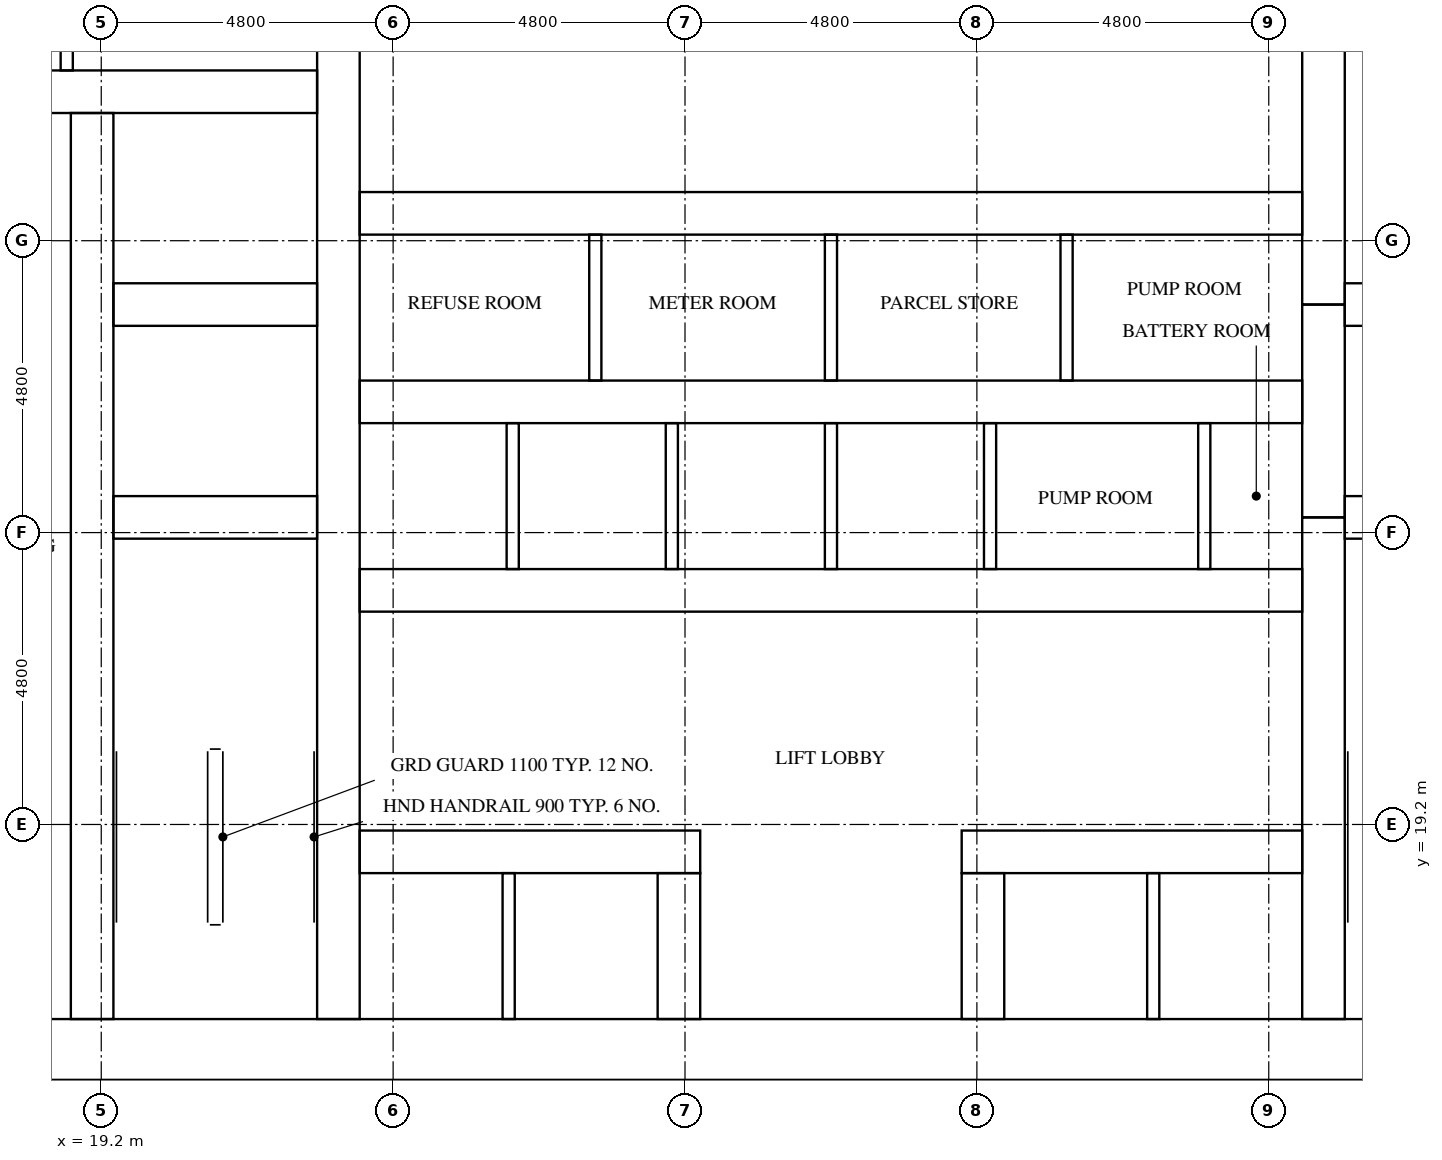
"""IFC4 building model, lengths in metres.
Left out: names, types, materials, properties, quantities, classifications, styles, units other than length and angle.
Written with IfcOpenShell. Run it as: python <this file> out.ifc"""

import sys

from ifc_helpers import new_model, si_unit, direction, frame, frame_2d, origin, place, context, subcontext, project, spatial, rectangle, extrude, element, fill, save


model = new_model("IFC4")
c1 = context("Model", 3, precision=1e-05, world=origin(), true_north=direction((0.0, 1.0)))
c2 = subcontext(c1, "Body", "Model", "MODEL_VIEW")
j1 = project(units=[si_unit("LENGTHUNIT", "METRE"), si_unit("PLANEANGLEUNIT", "RADIAN")], contexts=[c1])
p1 = place(None, origin())
s1 = spatial("IfcSite", under=j1, at=p1, CompositionType="ELEMENT")
p2 = place(p1, origin())
s2 = spatial("IfcBuilding", under=s1, at=p2, CompositionType="ELEMENT")
p3 = place(p2, frame((0.0, 0.0, 46.9)))
s3 = spatial("IfcBuildingStorey", under=s2, at=p3, CompositionType="ELEMENT", Elevation=46.9)
p4 = place(p3, frame((15.0, 15.5, 0.0), z_axis=(0.0, 0.0, 1.0), x_axis=(1.0, 0.0, 0.0)))
e1 = element("IfcWall", 1, at=p4, inside=s3, PredefinedType="SHEAR", context=c2, shape_type="SweptSolid", body=[
    extrude(rectangle(XDim=32.4, YDim=1.0, at=frame_2d((16.2, 0.0))), origin(), (0.0, 0.0, 1.0), 3.2),
])
p5 = place(p4, frame((15.3, 0.0, 0.0)))
e2 = element("IfcOpeningElement", 2, at=p5, cuts=e1, PredefinedType="OPENING", context=c2, shape_type="SweptSolid", body=[
    extrude(rectangle(XDim=1.8, YDim=2.1, at=frame_2d((0.9, 1.05))), frame((0.0, 0.51, 0.0), z_axis=(0.0, -1.0, 0.0), x_axis=(1.0, 0.0, 0.0)), (0.0, 0.0, 1.0), 1.02),
])
p6 = place(p3, frame((19.05, 16.0, 0.0), z_axis=(0.0, 0.0, 1.0), x_axis=(0.0, 1.0, 0.0)))
e3 = element("IfcWall", 3, at=p6, inside=s3, PredefinedType="SHEAR", context=c2, shape_type="SweptSolid", body=[
    extrude(rectangle(XDim=14.9, YDim=0.7, at=frame_2d((7.45, 0.0))), origin(), (0.0, 0.0, 1.0), 3.2),
])
p7 = place(p6, frame((9.45, 0.0, 0.0)))
e4 = element("IfcOpeningElement", 4, at=p7, cuts=e3, PredefinedType="OPENING", context=c2, shape_type="SweptSolid", body=[
    extrude(rectangle(XDim=1.1, YDim=2.1, at=frame_2d((0.55, 1.05))), frame((0.0, 0.36, 0.0), z_axis=(0.0, -1.0, 0.0), x_axis=(1.0, 0.0, 0.0)), (0.0, 0.0, 1.0), 0.72),
])
p8 = place(p6, frame((12.95, 0.0, 0.0)))
e5 = element("IfcOpeningElement", 5, at=p8, cuts=e3, PredefinedType="OPENING", context=c2, shape_type="SweptSolid", body=[
    extrude(rectangle(XDim=1.1, YDim=2.1, at=frame_2d((0.55, 1.05))), frame((0.0, 0.36, 0.0), z_axis=(0.0, -1.0, 0.0), x_axis=(1.0, 0.0, 0.0)), (0.0, 0.0, 1.0), 0.72),
])
p9 = place(p6, frame((0.2, 0.0, 0.0)))
e6 = element("IfcOpeningElement", 6, at=p9, cuts=e3, PredefinedType="OPENING", context=c2, shape_type="SweptSolid", body=[
    extrude(rectangle(XDim=1.2, YDim=2.1, at=frame_2d((0.6, 1.05))), frame((0.0, 0.36, 0.0), z_axis=(0.0, -1.0, 0.0), x_axis=(1.0, 0.0, 0.0)), (0.0, 0.0, 1.0), 0.72),
])
p10 = place(p3, frame((23.1, 16.0, 0.0), z_axis=(0.0, 0.0, 1.0), x_axis=(0.0, 1.0, 0.0)))
e7 = element("IfcWall", 7, at=p10, inside=s3, PredefinedType="SHEAR", context=c2, shape_type="SweptSolid", body=[
    extrude(rectangle(XDim=20.8, YDim=0.7, at=frame_2d((10.4, 0.0))), origin(), (0.0, 0.0, 1.0), 3.2),
])
p11 = place(p3, frame((39.3, 16.0, 0.0), z_axis=(0.0, 0.0, 1.0), x_axis=(0.0, 1.0, 0.0)))
e8 = element("IfcWall", 8, at=p11, inside=s3, PredefinedType="SHEAR", context=c2, shape_type="SweptSolid", body=[
    extrude(rectangle(XDim=8.25, YDim=0.7, at=frame_2d((4.125, 0.0))), origin(), (0.0, 0.0, 1.0), 3.2),
])
p12 = place(p3, frame((39.3, 24.25, 0.0), z_axis=(0.0, 0.0, 1.0), x_axis=(0.0, 1.0, 0.0)))
e9 = element("IfcWall", 9, at=p12, inside=s3, PredefinedType="SHEAR", context=c2, shape_type="SweptSolid", body=[
    extrude(rectangle(XDim=3.5, YDim=0.7, at=frame_2d((1.75, 0.0))), origin(), (0.0, 0.0, 1.0), 3.2),
])
p13 = place(p3, frame((39.3, 27.75, 0.0), z_axis=(0.0, 0.0, 1.0), x_axis=(0.0, 1.0, 0.0)))
e10 = element("IfcWall", 10, at=p13, inside=s3, PredefinedType="SHEAR", context=c2, shape_type="SweptSolid", body=[
    extrude(rectangle(XDim=9.05, YDim=0.7, at=frame_2d((4.525, 0.0))), origin(), (0.0, 0.0, 1.0), 3.2),
])
for number, where, z_axis, x_axis in (
    (11, (19.4, 24.25, 0.0), (0.0, 0.0, 1.0), (1.0, 0.0, 0.0)),
    (12, (19.4, 27.75, 0.0), (0.0, 0.0, 1.0), (1.0, 0.0, 0.0)),
):
    element("IfcWall", number, at=place(p3, frame(where, z_axis=z_axis, x_axis=x_axis)), inside=s3, PredefinedType="SHEAR", context=c2, shape_type="SweptSolid", body=[
        extrude(rectangle(XDim=3.35, YDim=0.7, at=frame_2d((1.675, 0.0))), origin(), (0.0, 0.0, 1.0), 3.2),
    ])
p14 = place(p3, frame((16.0, 31.25, 0.0), z_axis=(0.0, 0.0, 1.0), x_axis=(1.0, 0.0, 0.0)))
e13 = element("IfcWall", 13, at=p14, inside=s3, PredefinedType="SHEAR", context=c2, shape_type="SweptSolid", body=[
    extrude(rectangle(XDim=6.75, YDim=0.7, at=frame_2d((3.375, 0.0))), origin(), (0.0, 0.0, 1.0), 3.2),
])
for number, where, z_axis, x_axis in (
    (14, (39.65, 24.25, 0.0), (0.0, 0.0, 1.0), (1.0, 0.0, 0.0)),
    (15, (39.65, 27.75, 0.0), (0.0, 0.0, 1.0), (1.0, 0.0, 0.0)),
):
    element("IfcWall", number, at=place(p3, frame(where, z_axis=z_axis, x_axis=x_axis)), inside=s3, PredefinedType="SHEAR", context=c2, shape_type="SweptSolid", body=[
        extrude(rectangle(XDim=3.35, YDim=0.7, at=frame_2d((1.675, 0.0))), origin(), (0.0, 0.0, 1.0), 3.2),
    ])
p15 = place(p3, frame((23.45, 18.75, 0.0), z_axis=(0.0, 0.0, 1.0), x_axis=(1.0, 0.0, 0.0)))
e16 = element("IfcWall", 16, at=p15, inside=s3, PredefinedType="SHEAR", context=c2, shape_type="SweptSolid", body=[
    extrude(rectangle(XDim=5.6, YDim=0.7, at=frame_2d((2.8, 0.0))), origin(), (0.0, 0.0, 1.0), 3.2),
])
p16 = place(p15, frame((0.625, 0.0, 0.0)))
e17 = element("IfcOpeningElement", 17, at=p16, cuts=e16, PredefinedType="OPENING", context=c2, shape_type="SweptSolid", body=[
    extrude(rectangle(XDim=1.1, YDim=2.1, at=frame_2d((0.55, 1.05))), frame((0.0, 0.36, 0.0), z_axis=(0.0, -1.0, 0.0), x_axis=(1.0, 0.0, 0.0)), (0.0, 0.0, 1.0), 0.72),
])
p17 = place(p15, frame((3.175, 0.0, 0.0)))
e18 = element("IfcOpeningElement", 18, at=p17, cuts=e16, PredefinedType="OPENING", context=c2, shape_type="SweptSolid", body=[
    extrude(rectangle(XDim=1.1, YDim=2.1, at=frame_2d((0.55, 1.05))), frame((0.0, 0.36, 0.0), z_axis=(0.0, -1.0, 0.0), x_axis=(1.0, 0.0, 0.0)), (0.0, 0.0, 1.0), 0.72),
])
p18 = place(p3, frame((33.35, 18.75, 0.0), z_axis=(0.0, 0.0, 1.0), x_axis=(1.0, 0.0, 0.0)))
e19 = element("IfcWall", 19, at=p18, inside=s3, PredefinedType="SHEAR", context=c2, shape_type="SweptSolid", body=[
    extrude(rectangle(XDim=5.6, YDim=0.7, at=frame_2d((2.8, 0.0))), origin(), (0.0, 0.0, 1.0), 3.2),
])
p19 = place(p18, frame((1.325, 0.0, 0.0)))
e20 = element("IfcOpeningElement", 20, at=p19, cuts=e19, PredefinedType="OPENING", context=c2, shape_type="SweptSolid", body=[
    extrude(rectangle(XDim=1.1, YDim=2.1, at=frame_2d((0.55, 1.05))), frame((0.0, 0.36, 0.0), z_axis=(0.0, -1.0, 0.0), x_axis=(1.0, 0.0, 0.0)), (0.0, 0.0, 1.0), 0.72),
])
p20 = place(p18, frame((3.875, 0.0, 0.0)))
e21 = element("IfcOpeningElement", 21, at=p20, cuts=e19, PredefinedType="OPENING", context=c2, shape_type="SweptSolid", body=[
    extrude(rectangle(XDim=1.1, YDim=2.1, at=frame_2d((0.55, 1.05))), frame((0.0, 0.36, 0.0), z_axis=(0.0, -1.0, 0.0), x_axis=(1.0, 0.0, 0.0)), (0.0, 0.0, 1.0), 0.72),
])
p21 = place(p3, frame((23.45, 23.05, 0.0), z_axis=(0.0, 0.0, 1.0), x_axis=(1.0, 0.0, 0.0)))
e22 = element("IfcWall", 22, at=p21, inside=s3, PredefinedType="SHEAR", context=c2, shape_type="SweptSolid", body=[
    extrude(rectangle(XDim=15.5, YDim=0.7, at=frame_2d((7.75, 0.0))), origin(), (0.0, 0.0, 1.0), 3.2),
])
p22 = place(p21, frame((0.658, 0.0, 0.0)))
e23 = element("IfcOpeningElement", 23, at=p22, cuts=e22, PredefinedType="OPENING", context=c2, shape_type="SweptSolid", body=[
    extrude(rectangle(XDim=1.1, YDim=2.1, at=frame_2d((0.55, 1.05))), frame((0.0, 0.36, 0.0), z_axis=(0.0, -1.0, 0.0), x_axis=(1.0, 0.0, 0.0)), (0.0, 0.0, 1.0), 0.72),
])
p23 = place(p21, frame((3.275, 0.0, 0.0)))
e24 = element("IfcOpeningElement", 24, at=p23, cuts=e22, PredefinedType="OPENING", context=c2, shape_type="SweptSolid", body=[
    extrude(rectangle(XDim=1.1, YDim=2.1, at=frame_2d((0.55, 1.05))), frame((0.0, 0.36, 0.0), z_axis=(0.0, -1.0, 0.0), x_axis=(1.0, 0.0, 0.0)), (0.0, 0.0, 1.0), 0.72),
])
p24 = place(p21, frame((11.628, 0.0, 0.0)))
e25 = element("IfcOpeningElement", 25, at=p24, cuts=e22, PredefinedType="OPENING", context=c2, shape_type="SweptSolid", body=[
    extrude(rectangle(XDim=1.0, YDim=2.1, at=frame_2d((0.5, 1.05))), frame((0.0, 0.36, 0.0), z_axis=(0.0, -1.0, 0.0), x_axis=(1.0, 0.0, 0.0)), (0.0, 0.0, 1.0), 0.72),
])
p25 = place(p21, frame((14.245, 0.0, 0.0)))
e26 = element("IfcOpeningElement", 26, at=p25, cuts=e22, PredefinedType="OPENING", context=c2, shape_type="SweptSolid", body=[
    extrude(rectangle(XDim=1.0, YDim=2.1, at=frame_2d((0.5, 1.05))), frame((0.0, 0.36, 0.0), z_axis=(0.0, -1.0, 0.0), x_axis=(1.0, 0.0, 0.0)), (0.0, 0.0, 1.0), 0.72),
])
p26 = place(p3, frame((23.45, 26.15, 0.0), z_axis=(0.0, 0.0, 1.0), x_axis=(1.0, 0.0, 0.0)))
e27 = element("IfcWall", 27, at=p26, inside=s3, PredefinedType="SHEAR", context=c2, shape_type="SweptSolid", body=[
    extrude(rectangle(XDim=15.5, YDim=0.7, at=frame_2d((7.75, 0.0))), origin(), (0.0, 0.0, 1.0), 3.2),
])
p27 = place(p3, frame((23.45, 29.25, 0.0), z_axis=(0.0, 0.0, 1.0), x_axis=(1.0, 0.0, 0.0)))
e28 = element("IfcWall", 28, at=p27, inside=s3, PredefinedType="SHEAR", context=c2, shape_type="SweptSolid", body=[
    extrude(rectangle(XDim=15.5, YDim=0.7, at=frame_2d((7.75, 0.0))), origin(), (0.0, 0.0, 1.0), 3.2),
])
p28 = place(p27, frame((1.387, 0.0, 0.0)))
e29 = element("IfcOpeningElement", 29, at=p28, cuts=e28, PredefinedType="OPENING", context=c2, shape_type="SweptSolid", body=[
    extrude(rectangle(XDim=1.0, YDim=2.1, at=frame_2d((0.5, 1.05))), frame((0.0, 0.36, 0.0), z_axis=(0.0, -1.0, 0.0), x_axis=(1.0, 0.0, 0.0)), (0.0, 0.0, 1.0), 0.72),
])
p29 = place(p27, frame((5.312, 0.0, 0.0)))
e30 = element("IfcOpeningElement", 30, at=p29, cuts=e28, PredefinedType="OPENING", context=c2, shape_type="SweptSolid", body=[
    extrude(rectangle(XDim=1.0, YDim=2.1, at=frame_2d((0.5, 1.05))), frame((0.0, 0.36, 0.0), z_axis=(0.0, -1.0, 0.0), x_axis=(1.0, 0.0, 0.0)), (0.0, 0.0, 1.0), 0.72),
])
p30 = place(p27, frame((9.188, 0.0, 0.0)))
e31 = element("IfcOpeningElement", 31, at=p30, cuts=e28, PredefinedType="OPENING", context=c2, shape_type="SweptSolid", body=[
    extrude(rectangle(XDim=1.0, YDim=2.1, at=frame_2d((0.5, 1.05))), frame((0.0, 0.36, 0.0), z_axis=(0.0, -1.0, 0.0), x_axis=(1.0, 0.0, 0.0)), (0.0, 0.0, 1.0), 0.72),
])
p31 = place(p27, frame((13.113, 0.0, 0.0)))
e32 = element("IfcOpeningElement", 32, at=p31, cuts=e28, PredefinedType="OPENING", context=c2, shape_type="SweptSolid", body=[
    extrude(rectangle(XDim=1.0, YDim=2.1, at=frame_2d((0.5, 1.05))), frame((0.0, 0.36, 0.0), z_axis=(0.0, -1.0, 0.0), x_axis=(1.0, 0.0, 0.0)), (0.0, 0.0, 1.0), 0.72),
])
for number, where, z_axis, x_axis in (
    (33, (28.7, 16.0, 0.0), (0.0, 0.0, 1.0), (0.0, 1.0, 0.0)),
    (34, (33.7, 16.0, 0.0), (0.0, 0.0, 1.0), (0.0, 1.0, 0.0)),
):
    element("IfcWall", number, at=place(p3, frame(where, z_axis=z_axis, x_axis=x_axis)), inside=s3, PredefinedType="SHEAR", context=c2, shape_type="SweptSolid", body=[
        extrude(rectangle(XDim=2.4, YDim=0.7, at=frame_2d((1.2, 0.0))), origin(), (0.0, 0.0, 1.0), 3.2),
    ])
for number, where, z_axis, x_axis in (
    (35, (25.967, 23.4, 0.0), (0.0, 0.0, 1.0), (0.0, 1.0, 0.0)),
    (36, (28.583, 23.4, 0.0), (0.0, 0.0, 1.0), (0.0, 1.0, 0.0)),
    (37, (31.2, 23.4, 0.0), (0.0, 0.0, 1.0), (0.0, 1.0, 0.0)),
    (38, (33.817, 23.4, 0.0), (0.0, 0.0, 1.0), (0.0, 1.0, 0.0)),
):
    element("IfcWall", number, at=place(p3, frame(where, z_axis=z_axis, x_axis=x_axis)), inside=s3, PredefinedType="SOLIDWALL", context=c2, shape_type="SweptSolid", body=[
        extrude(rectangle(XDim=2.4, YDim=0.2, at=frame_2d((1.2, 0.0))), origin(), (0.0, 0.0, 1.0), 3.2),
    ])
for number, where, z_axis, x_axis in (
    (39, (25.9, 16.0, 0.0), (0.0, 0.0, 1.0), (0.0, 1.0, 0.0)),
    (40, (36.5, 16.0, 0.0), (0.0, 0.0, 1.0), (0.0, 1.0, 0.0)),
):
    element("IfcWall", number, at=place(p3, frame(where, z_axis=z_axis, x_axis=x_axis)), inside=s3, PredefinedType="SOLIDWALL", context=c2, shape_type="SweptSolid", body=[
        extrude(rectangle(XDim=2.4, YDim=0.2, at=frame_2d((1.2, 0.0))), origin(), (0.0, 0.0, 1.0), 3.2),
    ])
p32 = place(p3, frame((18.633, 31.6, 0.0), z_axis=(0.0, 0.0, 1.0), x_axis=(0.0, 1.0, 0.0)))
e41 = element("IfcWall", 41, at=p32, inside=s3, PredefinedType="PARTITIONING", context=c2, shape_type="SweptSolid", body=[
    extrude(rectangle(XDim=5.2, YDim=0.2, at=frame_2d((2.6, 0.0))), origin(), (0.0, 0.0, 1.0), 3.2),
])
p33 = place(p3, frame((37.339, 23.4, 0.0), z_axis=(0.0, 0.0, 1.0), x_axis=(0.0, 1.0, 0.0)))
e42 = element("IfcWall", 42, at=p33, inside=s3, PredefinedType="PARTITIONING", context=c2, shape_type="SweptSolid", body=[
    extrude(rectangle(XDim=2.4, YDim=0.2, at=frame_2d((1.2, 0.0))), origin(), (0.0, 0.0, 1.0), 3.2),
])
for number, where, z_axis, x_axis in (
    (43, (27.325, 26.5, 0.0), (0.0, 0.0, 1.0), (0.0, 1.0, 0.0)),
    (44, (31.2, 26.5, 0.0), (0.0, 0.0, 1.0), (0.0, 1.0, 0.0)),
    (45, (35.075, 26.5, 0.0), (0.0, 0.0, 1.0), (0.0, 1.0, 0.0)),
):
    element("IfcWall", number, at=place(p3, frame(where, z_axis=z_axis, x_axis=x_axis)), inside=s3, PredefinedType="PARTITIONING", context=c2, shape_type="SweptSolid", body=[
        extrude(rectangle(XDim=2.4, YDim=0.2, at=frame_2d((1.2, 0.0))), origin(), (0.0, 0.0, 1.0), 3.2),
    ])
p34 = place(p16, origin())
e46 = element("IfcDoor", 46, at=p34, inside=s3, OperationType="DOUBLE_DOOR_SLIDING", PredefinedType="DOOR", context=c2, shape_type="SweptSolid", body=[
    extrude(rectangle(XDim=1.1, YDim=2.1, at=frame_2d((0.55, 1.05))), frame((0.0, 0.025, 0.0), z_axis=(0.0, -1.0, 0.0), x_axis=(1.0, 0.0, 0.0)), (0.0, 0.0, 1.0), 0.05),
])
fill(e17, e46)
p35 = place(p17, origin())
e47 = element("IfcDoor", 47, at=p35, inside=s3, OperationType="DOUBLE_DOOR_SLIDING", PredefinedType="DOOR", context=c2, shape_type="SweptSolid", body=[
    extrude(rectangle(XDim=1.1, YDim=2.1, at=frame_2d((0.55, 1.05))), frame((0.0, 0.025, 0.0), z_axis=(0.0, -1.0, 0.0), x_axis=(1.0, 0.0, 0.0)), (0.0, 0.0, 1.0), 0.05),
])
fill(e18, e47)
p36 = place(p19, origin())
e48 = element("IfcDoor", 48, at=p36, inside=s3, OperationType="DOUBLE_DOOR_SLIDING", PredefinedType="DOOR", context=c2, shape_type="SweptSolid", body=[
    extrude(rectangle(XDim=1.1, YDim=2.1, at=frame_2d((0.55, 1.05))), frame((0.0, 0.025, 0.0), z_axis=(0.0, -1.0, 0.0), x_axis=(1.0, 0.0, 0.0)), (0.0, 0.0, 1.0), 0.05),
])
fill(e20, e48)
p37 = place(p20, origin())
e49 = element("IfcDoor", 49, at=p37, inside=s3, OperationType="DOUBLE_DOOR_SLIDING", PredefinedType="DOOR", context=c2, shape_type="SweptSolid", body=[
    extrude(rectangle(XDim=1.1, YDim=2.1, at=frame_2d((0.55, 1.05))), frame((0.0, 0.025, 0.0), z_axis=(0.0, -1.0, 0.0), x_axis=(1.0, 0.0, 0.0)), (0.0, 0.0, 1.0), 0.05),
])
fill(e21, e49)
p38 = place(p22, origin())
e50 = element("IfcDoor", 50, at=p38, inside=s3, OperationType="DOUBLE_DOOR_SLIDING", PredefinedType="DOOR", context=c2, shape_type="SweptSolid", body=[
    extrude(rectangle(XDim=1.1, YDim=2.1, at=frame_2d((0.55, 1.05))), frame((0.0, 0.025, 0.0), z_axis=(0.0, -1.0, 0.0), x_axis=(1.0, 0.0, 0.0)), (0.0, 0.0, 1.0), 0.05),
])
fill(e23, e50)
p39 = place(p23, origin())
e51 = element("IfcDoor", 51, at=p39, inside=s3, OperationType="DOUBLE_DOOR_SLIDING", PredefinedType="DOOR", context=c2, shape_type="SweptSolid", body=[
    extrude(rectangle(XDim=1.1, YDim=2.1, at=frame_2d((0.55, 1.05))), frame((0.0, 0.025, 0.0), z_axis=(0.0, -1.0, 0.0), x_axis=(1.0, 0.0, 0.0)), (0.0, 0.0, 1.0), 0.05),
])
fill(e24, e51)
p40 = place(p7, origin())
e52 = element("IfcDoor", 52, at=p40, inside=s3, OperationType="DOUBLE_DOOR_SLIDING", PredefinedType="DOOR", context=c2, shape_type="SweptSolid", body=[
    extrude(rectangle(XDim=1.1, YDim=2.1, at=frame_2d((0.55, 1.05))), frame((0.0, 0.025, 0.0), z_axis=(0.0, -1.0, 0.0), x_axis=(1.0, 0.0, 0.0)), (0.0, 0.0, 1.0), 0.05),
])
fill(e4, e52)
p41 = place(p8, origin())
e53 = element("IfcDoor", 53, at=p41, inside=s3, OperationType="DOUBLE_DOOR_SLIDING", PredefinedType="DOOR", context=c2, shape_type="SweptSolid", body=[
    extrude(rectangle(XDim=1.1, YDim=2.1, at=frame_2d((0.55, 1.05))), frame((0.0, 0.025, 0.0), z_axis=(0.0, -1.0, 0.0), x_axis=(1.0, 0.0, 0.0)), (0.0, 0.0, 1.0), 0.05),
])
fill(e5, e53)
p42 = place(p9, frame((1.2, 0.0, 0.0), z_axis=(0.0, 0.0, 1.0), x_axis=(-1.0, 0.0, 0.0)))
e54 = element("IfcDoor", 54, at=p42, inside=s3, OperationType="SINGLE_SWING_LEFT", PredefinedType="DOOR", context=c2, shape_type="SweptSolid", body=[
    extrude(rectangle(XDim=1.2, YDim=2.1, at=frame_2d((0.6, 1.05))), frame((0.0, 0.025, 0.0), z_axis=(0.0, -1.0, 0.0), x_axis=(1.0, 0.0, 0.0)), (0.0, 0.0, 1.0), 0.05),
])
fill(e6, e54)
p43 = place(p5, frame((1.8, 0.0, 0.0), z_axis=(0.0, 0.0, 1.0), x_axis=(-1.0, 0.0, 0.0)))
e55 = element("IfcDoor", 55, at=p43, inside=s3, OperationType="DOUBLE_DOOR_SINGLE_SWING", PredefinedType="DOOR", context=c2, shape_type="SweptSolid", body=[
    extrude(rectangle(XDim=1.8, YDim=2.1, at=frame_2d((0.9, 1.05))), frame((0.0, 0.025, 0.0), z_axis=(0.0, -1.0, 0.0), x_axis=(1.0, 0.0, 0.0)), (0.0, 0.0, 1.0), 0.05),
])
fill(e2, e55)
p44 = place(p24, frame((1.0, 0.0, 0.0), z_axis=(0.0, 0.0, 1.0), x_axis=(-1.0, 0.0, 0.0)))
e56 = element("IfcDoor", 56, at=p44, inside=s3, OperationType="SINGLE_SWING_RIGHT", PredefinedType="DOOR", context=c2, shape_type="SweptSolid", body=[
    extrude(rectangle(XDim=1.0, YDim=2.1, at=frame_2d((0.5, 1.05))), frame((0.0, 0.025, 0.0), z_axis=(0.0, -1.0, 0.0), x_axis=(1.0, 0.0, 0.0)), (0.0, 0.0, 1.0), 0.05),
])
fill(e25, e56)
p45 = place(p25, frame((1.0, 0.0, 0.0), z_axis=(0.0, 0.0, 1.0), x_axis=(-1.0, 0.0, 0.0)))
e57 = element("IfcDoor", 57, at=p45, inside=s3, OperationType="SINGLE_SWING_LEFT", PredefinedType="DOOR", context=c2, shape_type="SweptSolid", body=[
    extrude(rectangle(XDim=1.0, YDim=2.1, at=frame_2d((0.5, 1.05))), frame((0.0, 0.025, 0.0), z_axis=(0.0, -1.0, 0.0), x_axis=(1.0, 0.0, 0.0)), (0.0, 0.0, 1.0), 0.05),
])
fill(e26, e57)
p46 = place(p28, origin())
e58 = element("IfcDoor", 58, at=p46, inside=s3, OperationType="SINGLE_SWING_RIGHT", PredefinedType="DOOR", context=c2, shape_type="SweptSolid", body=[
    extrude(rectangle(XDim=1.0, YDim=2.1, at=frame_2d((0.5, 1.05))), frame((0.0, 0.025, 0.0), z_axis=(0.0, -1.0, 0.0), x_axis=(1.0, 0.0, 0.0)), (0.0, 0.0, 1.0), 0.05),
])
fill(e29, e58)
p47 = place(p29, origin())
e59 = element("IfcDoor", 59, at=p47, inside=s3, OperationType="SINGLE_SWING_LEFT", PredefinedType="DOOR", context=c2, shape_type="SweptSolid", body=[
    extrude(rectangle(XDim=1.0, YDim=2.1, at=frame_2d((0.5, 1.05))), frame((0.0, 0.025, 0.0), z_axis=(0.0, -1.0, 0.0), x_axis=(1.0, 0.0, 0.0)), (0.0, 0.0, 1.0), 0.05),
])
fill(e30, e59)
p48 = place(p30, origin())
e60 = element("IfcDoor", 60, at=p48, inside=s3, OperationType="SINGLE_SWING_RIGHT", PredefinedType="DOOR", context=c2, shape_type="SweptSolid", body=[
    extrude(rectangle(XDim=1.0, YDim=2.1, at=frame_2d((0.5, 1.05))), frame((0.0, 0.025, 0.0), z_axis=(0.0, -1.0, 0.0), x_axis=(1.0, 0.0, 0.0)), (0.0, 0.0, 1.0), 0.05),
])
fill(e31, e60)
p49 = place(p31, origin())
e61 = element("IfcDoor", 61, at=p49, inside=s3, OperationType="SINGLE_SWING_LEFT", PredefinedType="DOOR", context=c2, shape_type="SweptSolid", body=[
    extrude(rectangle(XDim=1.0, YDim=2.1, at=frame_2d((0.5, 1.05))), frame((0.0, 0.025, 0.0), z_axis=(0.0, -1.0, 0.0), x_axis=(1.0, 0.0, 0.0)), (0.0, 0.0, 1.0), 0.05),
])
fill(e32, e61)
save(model, sys.argv[1])
